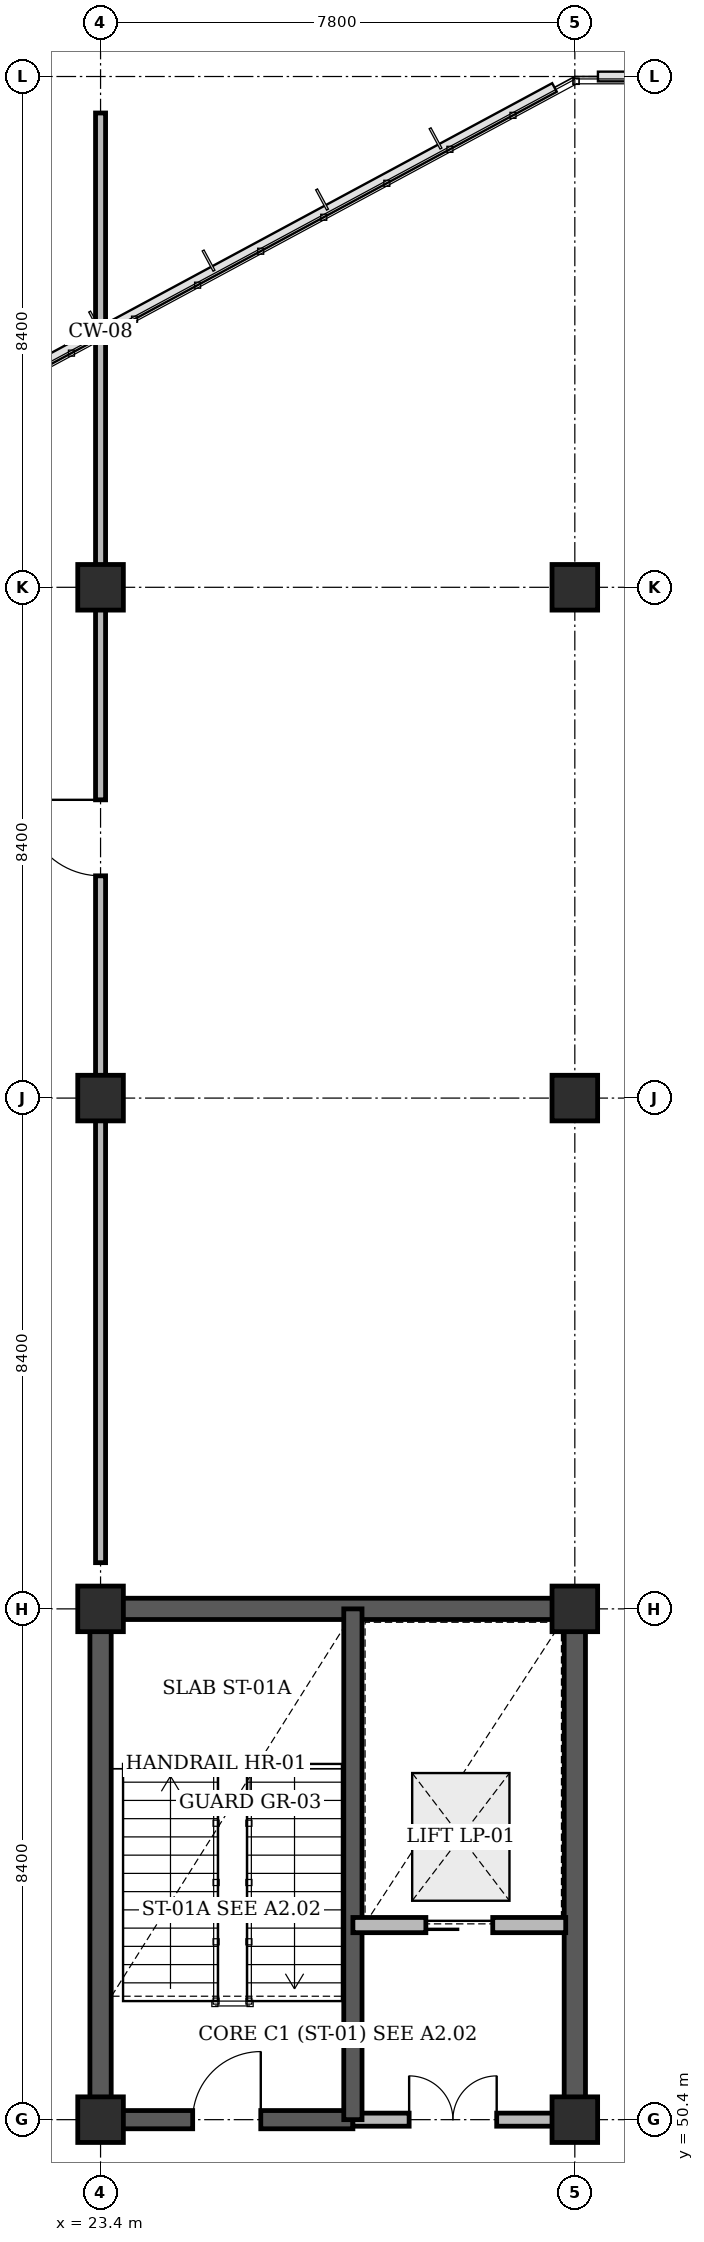
"""IFC4 building model, lengths in metres.
Left out: names, types, materials, properties, quantities, classifications, styles, units other than length and angle.
Written with IfcOpenShell. Run it as: python <this file> out.ifc"""

import sys

from ifc_helpers import new_model, si_unit, direction, frame, frame_2d, origin, origin_2d, place, context, subcontext, project, spatial, rectangle, extrude, element, fill, save


model = new_model("IFC4")
c1 = context("Model", 3, precision=1e-05, world=origin(), true_north=direction((0.0, 1.0)))
c2 = subcontext(c1, "Body", "Model", "MODEL_VIEW")
j1 = project(units=[si_unit("LENGTHUNIT", "METRE"), si_unit("PLANEANGLEUNIT", "RADIAN")], contexts=[c1])
p1 = place(None, origin())
s1 = spatial("IfcSite", under=j1, at=p1, CompositionType="ELEMENT")
p2 = place(p1, origin())
s2 = spatial("IfcBuilding", under=s1, at=p2, CompositionType="ELEMENT")
p3 = place(p2, frame((0.0, 0.0, -4.8)))
s3 = spatial("IfcBuildingStorey", under=s2, at=p3, CompositionType="ELEMENT", Elevation=-4.8)
p4 = place(p3, frame((23.225, 58.8, 0.0), z_axis=(0.0, 0.0, 1.0), x_axis=(1.0, 0.0, 0.0)))
e1 = element("IfcWall", 1, at=p4, inside=s3, PredefinedType="SHEAR", context=c2, shape_type="SweptSolid", body=[
    extrude(rectangle(XDim=8.15, YDim=0.35, at=frame_2d((4.075, 0.0))), origin(), (0.0, 0.0, 1.0), 4.4),
])
for number, where, z_axis, x_axis in (
    (2, (23.4, 50.4, 0.0), (0.0, 0.0, 1.0), (0.0, 1.0, 0.0)),
    (3, (31.2, 50.4, 0.0), (0.0, 0.0, 1.0), (0.0, 1.0, 0.0)),
):
    element("IfcWall", number, at=place(p3, frame(where, z_axis=z_axis, x_axis=x_axis)), inside=s3, PredefinedType="SHEAR", context=c2, shape_type="SweptSolid", body=[
        extrude(rectangle(XDim=8.4, YDim=0.35, at=frame_2d((4.2, 0.0))), origin(), (0.0, 0.0, 1.0), 4.4),
    ])
p5 = place(p3, frame((46.8, 84.0, 0.0), z_axis=(0.0, 0.0, 1.0), x_axis=(-1.0, 0.0, 0.0)))
e4 = element("IfcWall", 4, at=p5, inside=s3, PredefinedType="SOLIDWALL", context=c2, shape_type="SweptSolid", body=[
    extrude(rectangle(XDim=15.6, YDim=0.4, at=frame_2d((7.8, 0.0))), origin(), (0.0, 0.0, 1.0), 4.8),
])
p6 = place(p3, frame((31.2, 84.0, 0.0), z_axis=(0.0, 0.0, 1.0), x_axis=(-0.880471542384, -0.474099001319, 0.0)))
e5 = element("IfcWall", 5, at=p6, inside=s3, PredefinedType="SOLIDWALL", context=c2, shape_type="SweptSolid", body=[
    extrude(rectangle(XDim=17.718, YDim=0.4, at=frame_2d((8.859, 0.0))), origin(), (0.0, 0.0, 1.0), 4.8),
])
for number, where, z_axis, x_axis in (
    (6, (23.4, 50.4, 0.0), (0.0, 0.0, 1.0), (1.0, 0.0, 0.0)),
    (7, (23.4, 58.8, 0.0), (0.0, 0.0, 1.0), (1.0, 0.0, 0.0)),
    (8, (23.4, 67.2, 0.0), (0.0, 0.0, 1.0), (1.0, 0.0, 0.0)),
    (9, (23.4, 75.6, 0.0), (0.0, 0.0, 1.0), (1.0, 0.0, 0.0)),
    (10, (31.2, 50.4, 0.0), (0.0, 0.0, 1.0), (1.0, 0.0, 0.0)),
    (11, (31.2, 58.8, 0.0), (0.0, 0.0, 1.0), (1.0, 0.0, 0.0)),
    (12, (31.2, 67.2, 0.0), (0.0, 0.0, 1.0), (1.0, 0.0, 0.0)),
    (13, (31.2, 75.6, 0.0), (0.0, 0.0, 1.0), (1.0, 0.0, 0.0)),
):
    element("IfcColumn", number, at=place(p3, frame(where, z_axis=z_axis, x_axis=x_axis)), inside=s3, PredefinedType="COLUMN", context=c2, shape_type="SweptSolid", body=[
        extrude(rectangle(XDim=0.9, YDim=0.9, at=origin_2d()), origin(), (0.0, 0.0, 1.0), 4.8),
    ])
p7 = place(p3, frame((23.4, 50.4, 0.0), z_axis=(0.0, 0.0, 1.0), x_axis=(1.0, 0.0, 0.0)))
e14 = element("IfcWall", 14, at=p7, inside=s3, PredefinedType="SHEAR", context=c2, shape_type="SweptSolid", body=[
    extrude(rectangle(XDim=4.15, YDim=0.3, at=frame_2d((2.075, 0.0))), origin(), (0.0, 0.0, 1.0), 4.8),
])
p8 = place(p7, frame((1.515, 0.0, 0.0)))
e15 = element("IfcOpeningElement", 15, at=p8, cuts=e14, PredefinedType="OPENING", context=c2, shape_type="SweptSolid", body=[
    extrude(rectangle(XDim=1.12, YDim=2.15, at=frame_2d((0.56, 1.075))), frame((0.0, 0.16, 0.0), z_axis=(0.0, -1.0, 0.0), x_axis=(1.0, 0.0, 0.0)), (0.0, 0.0, 1.0), 0.32),
])
p9 = place(p3, frame((27.55, 50.4, 0.0), z_axis=(0.0, 0.0, 1.0), x_axis=(1.0, 0.0, 0.0)))
e16 = element("IfcWall", 16, at=p9, inside=s3, PredefinedType="STANDARD", context=c2, shape_type="SweptSolid", body=[
    extrude(rectangle(XDim=3.29, YDim=0.215, at=frame_2d((1.645, 0.0))), origin(), (0.0, 0.0, 1.0), 3.53),
])
p10 = place(p9, frame((0.925, 0.0, 0.0)))
e17 = element("IfcOpeningElement", 17, at=p10, cuts=e16, PredefinedType="OPENING", context=c2, shape_type="SweptSolid", body=[
    extrude(rectangle(XDim=1.44, YDim=2.2, at=frame_2d((0.72, 1.1))), frame((0.0, 0.118, 0.0), z_axis=(0.0, -1.0, 0.0), x_axis=(1.0, 0.0, 0.0)), (0.0, 0.0, 1.0), 0.235),
])
p11 = place(p3, frame((27.55, 50.4, 0.0), z_axis=(0.0, 0.0, 1.0), x_axis=(0.0, 1.0, 0.0)))
e18 = element("IfcWall", 18, at=p11, inside=s3, PredefinedType="SHEAR", context=c2, shape_type="SweptSolid", body=[
    extrude(rectangle(XDim=8.4, YDim=0.3, at=frame_2d((4.2, 0.0))), origin(), (0.0, 0.0, 1.0), 4.8),
])
p12 = place(p3, frame((27.55, 53.6, 0.0), z_axis=(0.0, 0.0, 1.0), x_axis=(1.0, 0.0, 0.0)))
e19 = element("IfcWall", 19, at=p12, inside=s3, PredefinedType="STANDARD", context=c2, shape_type="SweptSolid", body=[
    extrude(rectangle(XDim=3.5, YDim=0.25, at=frame_2d((1.75, 0.0))), origin(), (0.0, 0.0, 1.0), 4.46),
])
p13 = place(p12, frame((1.2, 0.0, 0.0)))
e20 = element("IfcOpeningElement", 20, at=p13, cuts=e19, PredefinedType="OPENING", context=c2, shape_type="SweptSolid", body=[
    extrude(rectangle(XDim=1.1, YDim=2.2, at=frame_2d((0.55, 1.1))), frame((0.0, 0.135, 0.0), z_axis=(0.0, -1.0, 0.0), x_axis=(1.0, 0.0, 0.0)), (0.0, 0.0, 1.0), 0.27),
])
p14 = place(p8, origin())
e21 = element("IfcDoor", 21, at=p14, inside=s3, OperationType="SINGLE_SWING_LEFT", PredefinedType="DOOR", context=c2, shape_type="SweptSolid", body=[
    extrude(rectangle(XDim=1.12, YDim=2.15, at=frame_2d((0.56, 1.075))), frame((0.0, 0.025, 0.0), z_axis=(0.0, -1.0, 0.0), x_axis=(1.0, 0.0, 0.0)), (0.0, 0.0, 1.0), 0.05),
])
fill(e15, e21)
p15 = place(p10, origin())
e22 = element("IfcDoor", 22, at=p15, inside=s3, OperationType="DOUBLE_DOOR_SINGLE_SWING", PredefinedType="DOOR", context=c2, shape_type="SweptSolid", body=[
    extrude(rectangle(XDim=1.44, YDim=2.2, at=frame_2d((0.72, 1.1))), frame((0.0, 0.025, 0.0), z_axis=(0.0, -1.0, 0.0), x_axis=(1.0, 0.0, 0.0)), (0.0, 0.0, 1.0), 0.05),
])
fill(e17, e22)
p16 = place(p13, origin())
e23 = element("IfcDoor", 23, at=p16, inside=s3, OperationType="SLIDING_TO_LEFT", PredefinedType="DOOR", context=c2, shape_type="SweptSolid", body=[
    extrude(rectangle(XDim=1.1, YDim=2.2, at=frame_2d((0.55, 1.1))), frame((0.0, 0.025, 0.0), z_axis=(0.0, -1.0, 0.0), x_axis=(1.0, 0.0, 0.0)), (0.0, 0.0, 1.0), 0.05),
])
fill(e20, e23)
save(model, sys.argv[1])
